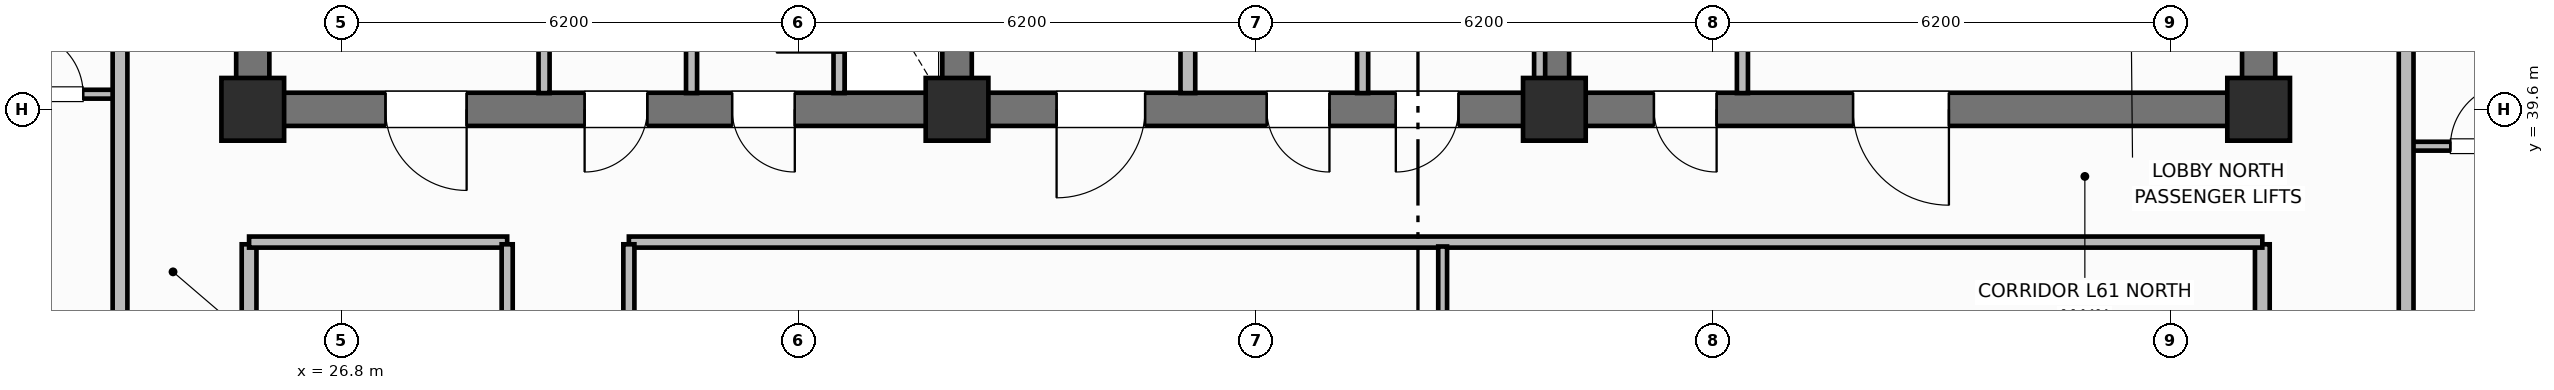
"""IFC4 building model, lengths in metres.
Left out: names, types, materials, properties, quantities, classifications, styles, units other than length and angle.
Written with IfcOpenShell. Run it as: python <this file> out.ifc"""

import sys

from ifc_helpers import new_model, si_unit, direction, frame, frame_2d, origin, origin_2d, place, context, subcontext, project, spatial, rectangle, extrude, element, fill, save


model = new_model("IFC4")
c1 = context("Model", 3, precision=1e-05, world=origin(), true_north=direction((0.0, 1.0)))
c2 = subcontext(c1, "Body", "Model", "MODEL_VIEW")
j1 = project(units=[si_unit("LENGTHUNIT", "METRE"), si_unit("PLANEANGLEUNIT", "RADIAN")], contexts=[c1])
p1 = place(None, origin())
s1 = spatial("IfcSite", under=j1, at=p1, CompositionType="ELEMENT")
p2 = place(p1, origin())
s2 = spatial("IfcBuilding", under=s1, at=p2, CompositionType="ELEMENT")
p3 = place(p2, frame((0.0, 0.0, 244.3)))
s3 = spatial("IfcBuildingStorey", under=s2, at=p3, CompositionType="ELEMENT", Elevation=244.3)
for number, where, z_axis, x_axis in (
    (1, (25.6, 39.825, 0.0), (0.0, 0.0, 1.0), (0.0, 1.0, 0.0)),
    (2, (52.8, 39.825, 0.0), (0.0, 0.0, 1.0), (0.0, 1.0, 0.0)),
):
    element("IfcWall", number, at=place(p3, frame(where, z_axis=z_axis, x_axis=x_axis)), inside=s3, PredefinedType="SHEAR", context=c2, shape_type="SweptSolid", body=[
        extrude(rectangle(XDim=5.75, YDim=0.45, at=frame_2d((2.875, 0.0))), origin(), (0.0, 0.0, 1.0), 3.7),
    ])
p4 = place(p3, frame((52.8, 39.6, 0.0), z_axis=(0.0, 0.0, 1.0), x_axis=(-1.0, 0.0, 0.0)))
e3 = element("IfcWall", 3, at=p4, inside=s3, PredefinedType="SHEAR", context=c2, shape_type="SweptSolid", body=[
    extrude(rectangle(XDim=27.2, YDim=0.45, at=frame_2d((13.6, 0.0))), origin(), (0.0, 0.0, 1.0), 3.7),
])
p5 = place(p4, frame((24.3, 0.0, 0.0)))
e4 = element("IfcOpeningElement", 4, at=p5, cuts=e3, PredefinedType="OPENING", context=c2, shape_type="SweptSolid", body=[
    extrude(rectangle(XDim=1.1, YDim=2.15, at=frame_2d((0.55, 1.075))), frame((0.0, 0.235, 0.0), z_axis=(0.0, -1.0, 0.0), x_axis=(1.0, 0.0, 0.0)), (0.0, 0.0, 1.0), 0.47),
])
p6 = place(p4, frame((21.85, 0.0, 0.0)))
e5 = element("IfcOpeningElement", 5, at=p6, cuts=e3, PredefinedType="OPENING", context=c2, shape_type="SweptSolid", body=[
    extrude(rectangle(XDim=0.85, YDim=2.1, at=frame_2d((0.425, 1.05))), frame((0.0, 0.235, 0.0), z_axis=(0.0, -1.0, 0.0), x_axis=(1.0, 0.0, 0.0)), (0.0, 0.0, 1.0), 0.47),
])
p7 = place(p4, frame((19.85, 0.0, 0.0)))
e6 = element("IfcOpeningElement", 6, at=p7, cuts=e3, PredefinedType="OPENING", context=c2, shape_type="SweptSolid", body=[
    extrude(rectangle(XDim=0.85, YDim=2.1, at=frame_2d((0.425, 1.05))), frame((0.0, 0.235, 0.0), z_axis=(0.0, -1.0, 0.0), x_axis=(1.0, 0.0, 0.0)), (0.0, 0.0, 1.0), 0.47),
])
p8 = place(p4, frame((15.1, 0.0, 0.0)))
e7 = element("IfcOpeningElement", 7, at=p8, cuts=e3, PredefinedType="OPENING", context=c2, shape_type="SweptSolid", body=[
    extrude(rectangle(XDim=1.2, YDim=2.15, at=frame_2d((0.6, 1.075))), frame((0.0, 0.235, 0.0), z_axis=(0.0, -1.0, 0.0), x_axis=(1.0, 0.0, 0.0)), (0.0, 0.0, 1.0), 0.47),
])
p9 = place(p4, frame((12.6, 0.0, 0.0)))
e8 = element("IfcOpeningElement", 8, at=p9, cuts=e3, PredefinedType="OPENING", context=c2, shape_type="SweptSolid", body=[
    extrude(rectangle(XDim=0.85, YDim=2.1, at=frame_2d((0.425, 1.05))), frame((0.0, 0.235, 0.0), z_axis=(0.0, -1.0, 0.0), x_axis=(1.0, 0.0, 0.0)), (0.0, 0.0, 1.0), 0.47),
])
p10 = place(p4, frame((10.85, 0.0, 0.0)))
e9 = element("IfcOpeningElement", 9, at=p10, cuts=e3, PredefinedType="OPENING", context=c2, shape_type="SweptSolid", body=[
    extrude(rectangle(XDim=0.85, YDim=2.1, at=frame_2d((0.425, 1.05))), frame((0.0, 0.235, 0.0), z_axis=(0.0, -1.0, 0.0), x_axis=(1.0, 0.0, 0.0)), (0.0, 0.0, 1.0), 0.47),
])
p11 = place(p4, frame((7.35, 0.0, 0.0)))
e10 = element("IfcOpeningElement", 10, at=p11, cuts=e3, PredefinedType="OPENING", context=c2, shape_type="SweptSolid", body=[
    extrude(rectangle(XDim=0.85, YDim=2.1, at=frame_2d((0.425, 1.05))), frame((0.0, 0.235, 0.0), z_axis=(0.0, -1.0, 0.0), x_axis=(1.0, 0.0, 0.0)), (0.0, 0.0, 1.0), 0.47),
])
p12 = place(p4, frame((4.2, 0.0, 0.0)))
e11 = element("IfcOpeningElement", 11, at=p12, cuts=e3, PredefinedType="OPENING", context=c2, shape_type="SweptSolid", body=[
    extrude(rectangle(XDim=1.3, YDim=2.2, at=frame_2d((0.65, 1.1))), frame((0.0, 0.235, 0.0), z_axis=(0.0, -1.0, 0.0), x_axis=(1.0, 0.0, 0.0)), (0.0, 0.0, 1.0), 0.47),
])
for number, where, z_axis, x_axis in (
    (12, (35.15, 39.825, 0.0), (0.0, 0.0, 1.0), (0.0, 1.0, 0.0)),
    (13, (43.25, 39.825, 0.0), (0.0, 0.0, 1.0), (0.0, 1.0, 0.0)),
):
    element("IfcWall", number, at=place(p3, frame(where, z_axis=z_axis, x_axis=x_axis)), inside=s3, PredefinedType="SHEAR", context=c2, shape_type="SweptSolid", body=[
        extrude(rectangle(XDim=5.75, YDim=0.4, at=frame_2d((2.875, 0.0))), origin(), (0.0, 0.0, 1.0), 3.7),
    ])
for number, where, z_axis, x_axis in (
    (14, (25.6, 39.6, 0.0), (0.0, 0.0, 1.0), (1.0, 0.0, 0.0)),
    (15, (35.15, 39.6, 0.0), (0.0, 0.0, 1.0), (1.0, 0.0, 0.0)),
    (16, (43.25, 39.6, 0.0), (0.0, 0.0, 1.0), (1.0, 0.0, 0.0)),
    (17, (52.8, 39.6, 0.0), (0.0, 0.0, 1.0), (1.0, 0.0, 0.0)),
):
    element("IfcColumn", number, at=place(p3, frame(where, z_axis=z_axis, x_axis=x_axis)), inside=s3, PredefinedType="COLUMN", context=c2, shape_type="SweptSolid", body=[
        extrude(rectangle(XDim=0.85, YDim=0.85, at=origin_2d()), origin(), (0.0, 0.0, 1.0), 3.7),
    ])
p13 = place(p3, frame((33.55, 39.82, 0.0), z_axis=(0.0, 0.0, 1.0), x_axis=(0.0, 1.0, 0.0)))
e18 = element("IfcWall", 18, at=p13, inside=s3, PredefinedType="PARTITIONING", context=c2, shape_type="SweptSolid", body=[
    extrude(rectangle(XDim=2.13, YDim=0.15, at=frame_2d((1.065, 0.0))), origin(), (0.0, 0.0, 1.0), 2.56),
])
p14 = place(p13, frame((0.55, 0.0, 0.0)))
e19 = element("IfcOpeningElement", 19, at=p14, cuts=e18, PredefinedType="OPENING", context=c2, shape_type="SweptSolid", body=[
    extrude(rectangle(XDim=0.85, YDim=2.05, at=frame_2d((0.425, 1.025))), frame((0.0, 0.085, 0.0), z_axis=(0.0, -1.0, 0.0), x_axis=(1.0, 0.0, 0.0)), (0.0, 0.0, 1.0), 0.17),
])
for number, where, z_axis, x_axis in (
    (20, (29.55, 39.82, 0.0), (0.0, 0.0, 1.0), (0.0, 1.0, 0.0)),
    (21, (31.55, 39.82, 0.0), (0.0, 0.0, 1.0), (0.0, 1.0, 0.0)),
):
    element("IfcWall", number, at=place(p3, frame(where, z_axis=z_axis, x_axis=x_axis)), inside=s3, PredefinedType="PARTITIONING", context=c2, shape_type="SweptSolid", body=[
        extrude(rectangle(XDim=2.13, YDim=0.15, at=frame_2d((1.065, 0.0))), origin(), (0.0, 0.0, 1.0), 2.56),
    ])
p15 = place(p3, frame((38.28, 39.82, 0.0), z_axis=(0.0, 0.0, 1.0), x_axis=(0.0, 1.0, 0.0)))
e22 = element("IfcWall", 22, at=p15, inside=s3, PredefinedType="PARTITIONING", context=c2, shape_type="SweptSolid", body=[
    extrude(rectangle(XDim=5.63, YDim=0.2, at=frame_2d((2.815, 0.0))), origin(), (0.0, 0.0, 1.0), 2.56),
])
for number, where, z_axis, x_axis in (
    (23, (43.05, 39.82, 0.0), (0.0, 0.0, 1.0), (0.0, 1.0, 0.0)),
    (24, (40.65, 39.82, 0.0), (0.0, 0.0, 1.0), (0.0, 1.0, 0.0)),
    (25, (45.8, 39.82, 0.0), (0.0, 0.0, 1.0), (0.0, 1.0, 0.0)),
):
    element("IfcWall", number, at=place(p3, frame(where, z_axis=z_axis, x_axis=x_axis)), inside=s3, PredefinedType="PARTITIONING", context=c2, shape_type="SweptSolid", body=[
        extrude(rectangle(XDim=5.63, YDim=0.15, at=frame_2d((2.815, 0.0))), origin(), (0.0, 0.0, 1.0), 2.56),
    ])
for number, where, z_axis, x_axis in (
    (26, (25.55, 18.63, 0.0), (0.0, 0.0, 1.0), (0.0, 1.0, 0.0)),
    (27, (52.85, 18.63, 0.0), (0.0, 0.0, 1.0), (0.0, 1.0, 0.0)),
):
    element("IfcWall", number, at=place(p3, frame(where, z_axis=z_axis, x_axis=x_axis)), inside=s3, PredefinedType="PARTITIONING", context=c2, shape_type="SweptSolid", body=[
        extrude(rectangle(XDim=19.14, YDim=0.2, at=frame_2d((9.57, 0.0))), origin(), (0.0, 0.0, 1.0), 2.56),
    ])
p16 = place(p3, frame((25.55, 37.8, 0.0), z_axis=(0.0, 0.0, 1.0), x_axis=(1.0, 0.0, 0.0)))
e28 = element("IfcWall", 28, at=p16, inside=s3, PredefinedType="PARTITIONING", context=c2, shape_type="SweptSolid", body=[
    extrude(rectangle(XDim=3.5, YDim=0.15, at=frame_2d((1.75, 0.0))), origin(), (0.0, 0.0, 1.0), 2.56),
])
p17 = place(p3, frame((30.7, 37.8, 0.0), z_axis=(0.0, 0.0, 1.0), x_axis=(1.0, 0.0, 0.0)))
e29 = element("IfcWall", 29, at=p17, inside=s3, PredefinedType="PARTITIONING", context=c2, shape_type="SweptSolid", body=[
    extrude(rectangle(XDim=22.15, YDim=0.15, at=frame_2d((11.075, 0.0))), origin(), (0.0, 0.0, 1.0), 2.56),
])
p18 = place(p3, frame((41.735, 29.388, 0.0), z_axis=(0.0, 0.0, 1.0), x_axis=(0.0, 1.0, 0.0)))
e30 = element("IfcWall", 30, at=p18, inside=s3, PredefinedType="PARTITIONING", context=c2, shape_type="SweptSolid", body=[
    extrude(rectangle(XDim=8.352, YDim=0.12, at=frame_2d((4.176, 0.0))), origin(), (0.0, 0.0, 1.0), 2.56),
])
p19 = place(p18, frame((2.0, 0.0, 0.0)))
e31 = element("IfcOpeningElement", 31, at=p19, cuts=e30, PredefinedType="OPENING", context=c2, shape_type="SweptSolid", body=[
    extrude(rectangle(XDim=0.9, YDim=2.1, at=frame_2d((0.45, 1.05))), frame((0.0, 0.07, 0.0), z_axis=(0.0, -1.0, 0.0), x_axis=(1.0, 0.0, 0.0)), (0.0, 0.0, 1.0), 0.14),
])
p20 = place(p3, frame((29.05, 18.63, 0.0), z_axis=(0.0, 0.0, 1.0), x_axis=(0.0, 1.0, 0.0)))
e32 = element("IfcWall", 32, at=p20, inside=s3, PredefinedType="PARTITIONING", context=c2, shape_type="SweptSolid", body=[
    extrude(rectangle(XDim=19.14, YDim=0.15, at=frame_2d((9.57, 0.0))), origin(), (0.0, 0.0, 1.0), 2.56),
])
p21 = place(p20, frame((5.5, 0.0, 0.0)))
e33 = element("IfcOpeningElement", 33, at=p21, cuts=e32, PredefinedType="OPENING", context=c2, shape_type="SweptSolid", body=[
    extrude(rectangle(XDim=1.0, YDim=2.15, at=frame_2d((0.5, 1.075))), frame((0.0, 0.085, 0.0), z_axis=(0.0, -1.0, 0.0), x_axis=(1.0, 0.0, 0.0)), (0.0, 0.0, 1.0), 0.17),
])
p22 = place(p3, frame((30.7, 18.63, 0.0), z_axis=(0.0, 0.0, 1.0), x_axis=(0.0, 1.0, 0.0)))
e34 = element("IfcWall", 34, at=p22, inside=s3, PredefinedType="PARTITIONING", context=c2, shape_type="SweptSolid", body=[
    extrude(rectangle(XDim=19.14, YDim=0.15, at=frame_2d((9.57, 0.0))), origin(), (0.0, 0.0, 1.0), 2.56),
])
p23 = place(p22, frame((2.2, 0.0, 0.0)))
e35 = element("IfcOpeningElement", 35, at=p23, cuts=e34, PredefinedType="OPENING", context=c2, shape_type="SweptSolid", body=[
    extrude(rectangle(XDim=1.0, YDim=2.15, at=frame_2d((0.5, 1.075))), frame((0.0, 0.085, 0.0), z_axis=(0.0, -1.0, 0.0), x_axis=(1.0, 0.0, 0.0)), (0.0, 0.0, 1.0), 0.17),
])
p24 = place(p22, frame((12.719, 0.0, 0.0)))
e36 = element("IfcOpeningElement", 36, at=p24, cuts=e34, PredefinedType="OPENING", context=c2, shape_type="SweptSolid", body=[
    extrude(rectangle(XDim=1.0, YDim=2.15, at=frame_2d((0.5, 1.075))), frame((0.0, 0.085, 0.0), z_axis=(0.0, -1.0, 0.0), x_axis=(1.0, 0.0, 0.0)), (0.0, 0.0, 1.0), 0.17),
])
p25 = place(p3, frame((21.85, 39.805, 0.0), z_axis=(0.0, 0.0, 1.0), x_axis=(1.0, 0.0, 0.0)))
e37 = element("IfcWall", 37, at=p25, inside=s3, PredefinedType="PARTITIONING", context=c2, shape_type="SweptSolid", body=[
    extrude(rectangle(XDim=1.95, YDim=0.12, at=frame_2d((0.975, 0.0))), origin(), (0.0, 0.0, 1.0), 2.56),
])
p26 = place(p25, frame((0.6, 0.0, 0.0)))
e38 = element("IfcOpeningElement", 38, at=p26, cuts=e37, PredefinedType="OPENING", context=c2, shape_type="SweptSolid", body=[
    extrude(rectangle(XDim=0.85, YDim=2.1, at=frame_2d((0.425, 1.05))), frame((0.0, 0.07, 0.0), z_axis=(0.0, -1.0, 0.0), x_axis=(1.0, 0.0, 0.0)), (0.0, 0.0, 1.0), 0.14),
])
p27 = place(p3, frame((23.8, 9.95, 0.0), z_axis=(0.0, 0.0, 1.0), x_axis=(0.0, 1.0, 0.0)))
e39 = element("IfcWall", 39, at=p27, inside=s3, PredefinedType="PARTITIONING", context=c2, shape_type="SweptSolid", body=[
    extrude(rectangle(XDim=36.5, YDim=0.2, at=frame_2d((18.25, 0.0))), origin(), (0.0, 0.0, 1.0), 2.56),
])
p28 = place(p27, frame((3.25, 0.0, 0.0)))
e40 = element("IfcOpeningElement", 40, at=p28, cuts=e39, PredefinedType="OPENING", context=c2, shape_type="SweptSolid", body=[
    extrude(rectangle(XDim=1.0, YDim=2.15, at=frame_2d((0.5, 1.075))), frame((0.0, 0.11, 0.0), z_axis=(0.0, -1.0, 0.0), x_axis=(1.0, 0.0, 0.0)), (0.0, 0.0, 1.0), 0.22),
])
p29 = place(p27, frame((13.3, 0.0, 0.0)))
e41 = element("IfcOpeningElement", 41, at=p29, cuts=e39, PredefinedType="OPENING", context=c2, shape_type="SweptSolid", body=[
    extrude(rectangle(XDim=1.0, YDim=2.15, at=frame_2d((0.5, 1.075))), frame((0.0, 0.11, 0.0), z_axis=(0.0, -1.0, 0.0), x_axis=(1.0, 0.0, 0.0)), (0.0, 0.0, 1.0), 0.22),
])
p30 = place(p27, frame((25.005, 0.0, 0.0)))
e42 = element("IfcOpeningElement", 42, at=p30, cuts=e39, PredefinedType="OPENING", context=c2, shape_type="SweptSolid", body=[
    extrude(rectangle(XDim=1.0, YDim=2.15, at=frame_2d((0.5, 1.075))), frame((0.0, 0.11, 0.0), z_axis=(0.0, -1.0, 0.0), x_axis=(1.0, 0.0, 0.0)), (0.0, 0.0, 1.0), 0.22),
])
p31 = place(p3, frame((54.8, 39.1, 0.0), z_axis=(0.0, 0.0, 1.0), x_axis=(1.0, 0.0, 0.0)))
e43 = element("IfcWall", 43, at=p31, inside=s3, PredefinedType="PARTITIONING", context=c2, shape_type="SweptSolid", body=[
    extrude(rectangle(XDim=1.95, YDim=0.12, at=frame_2d((0.975, 0.0))), origin(), (0.0, 0.0, 1.0), 2.56),
])
p32 = place(p31, frame((0.6, 0.0, 0.0)))
e44 = element("IfcOpeningElement", 44, at=p32, cuts=e43, PredefinedType="OPENING", context=c2, shape_type="SweptSolid", body=[
    extrude(rectangle(XDim=0.85, YDim=2.1, at=frame_2d((0.425, 1.05))), frame((0.0, 0.07, 0.0), z_axis=(0.0, -1.0, 0.0), x_axis=(1.0, 0.0, 0.0)), (0.0, 0.0, 1.0), 0.14),
])
p33 = place(p3, frame((54.8, 9.95, 0.0), z_axis=(0.0, 0.0, 1.0), x_axis=(0.0, 1.0, 0.0)))
e45 = element("IfcWall", 45, at=p33, inside=s3, PredefinedType="PARTITIONING", context=c2, shape_type="SweptSolid", body=[
    extrude(rectangle(XDim=36.5, YDim=0.2, at=frame_2d((18.25, 0.0))), origin(), (0.0, 0.0, 1.0), 2.56),
])
p34 = place(p33, frame((3.25, 0.0, 0.0)))
e46 = element("IfcOpeningElement", 46, at=p34, cuts=e45, PredefinedType="OPENING", context=c2, shape_type="SweptSolid", body=[
    extrude(rectangle(XDim=1.0, YDim=2.15, at=frame_2d((0.5, 1.075))), frame((0.0, 0.11, 0.0), z_axis=(0.0, -1.0, 0.0), x_axis=(1.0, 0.0, 0.0)), (0.0, 0.0, 1.0), 0.22),
])
p35 = place(p33, frame((12.96, 0.0, 0.0)))
e47 = element("IfcOpeningElement", 47, at=p35, cuts=e45, PredefinedType="OPENING", context=c2, shape_type="SweptSolid", body=[
    extrude(rectangle(XDim=1.0, YDim=2.15, at=frame_2d((0.5, 1.075))), frame((0.0, 0.11, 0.0), z_axis=(0.0, -1.0, 0.0), x_axis=(1.0, 0.0, 0.0)), (0.0, 0.0, 1.0), 0.22),
])
p36 = place(p33, frame((24.3, 0.0, 0.0)))
e48 = element("IfcOpeningElement", 48, at=p36, cuts=e45, PredefinedType="OPENING", context=c2, shape_type="SweptSolid", body=[
    extrude(rectangle(XDim=1.0, YDim=2.15, at=frame_2d((0.5, 1.075))), frame((0.0, 0.11, 0.0), z_axis=(0.0, -1.0, 0.0), x_axis=(1.0, 0.0, 0.0)), (0.0, 0.0, 1.0), 0.22),
])
p37 = place(p14, origin())
e49 = element("IfcDoor", 49, at=p37, inside=s3, OperationType="SINGLE_SWING_LEFT", PredefinedType="TRAPDOOR", context=c2, shape_type="SweptSolid", body=[
    extrude(rectangle(XDim=0.85, YDim=2.05, at=frame_2d((0.425, 1.025))), frame((0.0, 0.025, 0.0), z_axis=(0.0, -1.0, 0.0), x_axis=(1.0, 0.0, 0.0)), (0.0, 0.0, 1.0), 0.05),
])
fill(e19, e49)
p38 = place(p26, origin())
e50 = element("IfcDoor", 50, at=p38, inside=s3, OperationType="SINGLE_SWING_LEFT", PredefinedType="DOOR", context=c2, shape_type="SweptSolid", body=[
    extrude(rectangle(XDim=0.85, YDim=2.1, at=frame_2d((0.425, 1.05))), frame((0.0, 0.025, 0.0), z_axis=(0.0, -1.0, 0.0), x_axis=(1.0, 0.0, 0.0)), (0.0, 0.0, 1.0), 0.05),
])
fill(e38, e50)
p39 = place(p32, origin())
e51 = element("IfcDoor", 51, at=p39, inside=s3, OperationType="SINGLE_SWING_RIGHT", PredefinedType="DOOR", context=c2, shape_type="SweptSolid", body=[
    extrude(rectangle(XDim=0.85, YDim=2.1, at=frame_2d((0.425, 1.05))), frame((0.0, 0.025, 0.0), z_axis=(0.0, -1.0, 0.0), x_axis=(1.0, 0.0, 0.0)), (0.0, 0.0, 1.0), 0.05),
])
fill(e44, e51)
p40 = place(p5, origin())
e52 = element("IfcDoor", 52, at=p40, inside=s3, OperationType="SINGLE_SWING_LEFT", PredefinedType="DOOR", context=c2, shape_type="SweptSolid", body=[
    extrude(rectangle(XDim=1.1, YDim=2.15, at=frame_2d((0.55, 1.075))), frame((0.0, 0.025, 0.0), z_axis=(0.0, -1.0, 0.0), x_axis=(1.0, 0.0, 0.0)), (0.0, 0.0, 1.0), 0.05),
])
fill(e4, e52)
p41 = place(p6, origin())
e53 = element("IfcDoor", 53, at=p41, inside=s3, OperationType="SINGLE_SWING_RIGHT", PredefinedType="DOOR", context=c2, shape_type="SweptSolid", body=[
    extrude(rectangle(XDim=0.85, YDim=2.1, at=frame_2d((0.425, 1.05))), frame((0.0, 0.025, 0.0), z_axis=(0.0, -1.0, 0.0), x_axis=(1.0, 0.0, 0.0)), (0.0, 0.0, 1.0), 0.05),
])
fill(e5, e53)
p42 = place(p7, origin())
e54 = element("IfcDoor", 54, at=p42, inside=s3, OperationType="SINGLE_SWING_LEFT", PredefinedType="DOOR", context=c2, shape_type="SweptSolid", body=[
    extrude(rectangle(XDim=0.85, YDim=2.1, at=frame_2d((0.425, 1.05))), frame((0.0, 0.025, 0.0), z_axis=(0.0, -1.0, 0.0), x_axis=(1.0, 0.0, 0.0)), (0.0, 0.0, 1.0), 0.05),
])
fill(e6, e54)
p43 = place(p8, origin())
e55 = element("IfcDoor", 55, at=p43, inside=s3, OperationType="SINGLE_SWING_RIGHT", PredefinedType="DOOR", context=c2, shape_type="SweptSolid", body=[
    extrude(rectangle(XDim=1.2, YDim=2.15, at=frame_2d((0.6, 1.075))), frame((0.0, 0.025, 0.0), z_axis=(0.0, -1.0, 0.0), x_axis=(1.0, 0.0, 0.0)), (0.0, 0.0, 1.0), 0.05),
])
fill(e7, e55)
p44 = place(p9, origin())
e56 = element("IfcDoor", 56, at=p44, inside=s3, OperationType="SINGLE_SWING_LEFT", PredefinedType="DOOR", context=c2, shape_type="SweptSolid", body=[
    extrude(rectangle(XDim=0.85, YDim=2.1, at=frame_2d((0.425, 1.05))), frame((0.0, 0.025, 0.0), z_axis=(0.0, -1.0, 0.0), x_axis=(1.0, 0.0, 0.0)), (0.0, 0.0, 1.0), 0.05),
])
fill(e8, e56)
p45 = place(p10, origin())
e57 = element("IfcDoor", 57, at=p45, inside=s3, OperationType="SINGLE_SWING_RIGHT", PredefinedType="DOOR", context=c2, shape_type="SweptSolid", body=[
    extrude(rectangle(XDim=0.85, YDim=2.1, at=frame_2d((0.425, 1.05))), frame((0.0, 0.025, 0.0), z_axis=(0.0, -1.0, 0.0), x_axis=(1.0, 0.0, 0.0)), (0.0, 0.0, 1.0), 0.05),
])
fill(e9, e57)
p46 = place(p11, origin())
e58 = element("IfcDoor", 58, at=p46, inside=s3, OperationType="SINGLE_SWING_LEFT", PredefinedType="DOOR", context=c2, shape_type="SweptSolid", body=[
    extrude(rectangle(XDim=0.85, YDim=2.1, at=frame_2d((0.425, 1.05))), frame((0.0, 0.025, 0.0), z_axis=(0.0, -1.0, 0.0), x_axis=(1.0, 0.0, 0.0)), (0.0, 0.0, 1.0), 0.05),
])
fill(e10, e58)
p47 = place(p12, origin())
e59 = element("IfcDoor", 59, at=p47, inside=s3, OperationType="SINGLE_SWING_LEFT", PredefinedType="DOOR", context=c2, shape_type="SweptSolid", body=[
    extrude(rectangle(XDim=1.3, YDim=2.2, at=frame_2d((0.65, 1.1))), frame((0.0, 0.025, 0.0), z_axis=(0.0, -1.0, 0.0), x_axis=(1.0, 0.0, 0.0)), (0.0, 0.0, 1.0), 0.05),
])
fill(e11, e59)
save(model, sys.argv[1])
